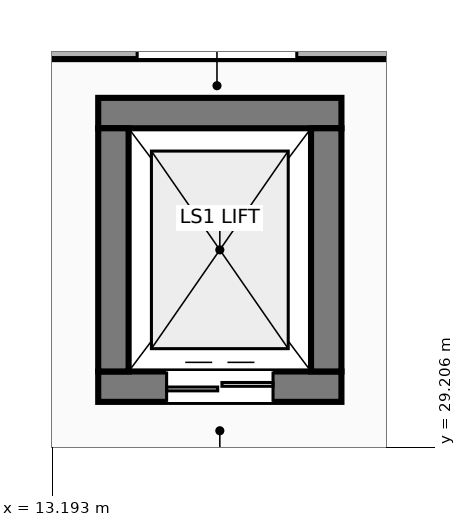
"""IFC4 building model, lengths in metres.
Left out: names, types, materials, properties, quantities, classifications, styles, units other than length and angle.
Written with IfcOpenShell. Run it as: python <this file> out.ifc"""

import sys

from ifc_helpers import new_model, si_unit, direction, frame, frame_2d, origin, place, context, subcontext, project, spatial, rectangle, extrude, element, fill, save


model = new_model("IFC4")
c1 = context("Model", 3, precision=1e-05, world=origin(), true_north=direction((0.0, 1.0)))
c2 = subcontext(c1, "Body", "Model", "MODEL_VIEW")
j1 = project(units=[si_unit("LENGTHUNIT", "METRE"), si_unit("PLANEANGLEUNIT", "RADIAN")], contexts=[c1])
p1 = place(None, origin())
s1 = spatial("IfcSite", under=j1, at=p1, CompositionType="ELEMENT")
p2 = place(p1, origin())
s2 = spatial("IfcBuilding", under=s1, at=p2, CompositionType="ELEMENT")
p3 = place(p2, frame((0.0, 0.0, 18.0)))
s3 = spatial("IfcBuildingStorey", under=s2, at=p3, CompositionType="ELEMENT", Elevation=18.0)
p4 = place(p3, frame((19.355, 34.445, 0.0), z_axis=(0.0, 0.0, 1.0), x_axis=(-1.0, 0.0, 0.0)))
e1 = element("IfcWall", 1, at=p4, inside=s3, PredefinedType="STANDARD", context=c2, shape_type="SweptSolid", body=[
    extrude(rectangle(XDim=7.985, YDim=0.27, at=frame_2d((3.992, 0.0))), origin(), (0.0, 0.0, 1.0), 3.275),
])
p5 = place(p4, frame((2.942, 0.0, 0.95)))
e2 = element("IfcOpeningElement", 2, at=p5, cuts=e1, PredefinedType="OPENING", context=c2, shape_type="SweptSolid", body=[
    extrude(rectangle(XDim=2.1, YDim=1.8, at=frame_2d((1.05, 0.9))), frame((0.0, 0.145, 0.0), z_axis=(0.0, -1.0, 0.0), x_axis=(1.0, 0.0, 0.0)), (0.0, 0.0, 1.0), 0.29),
])
p6 = place(p3, frame((13.8, 30.0, 0.0), z_axis=(0.0, 0.0, 1.0), x_axis=(1.0, 0.0, 0.0)))
e3 = element("IfcWall", 3, at=p6, inside=s3, PredefinedType="SHEAR", context=c2, shape_type="SweptSolid", body=[
    extrude(rectangle(XDim=3.2, YDim=0.4, at=frame_2d((1.6, 0.0))), origin(), (0.0, 0.0, 1.0), 4.2),
])
p7 = place(p6, frame((0.9, 0.0, 0.0)))
e4 = element("IfcOpeningElement", 4, at=p7, cuts=e3, PredefinedType="OPENING", context=c2, shape_type="SweptSolid", body=[
    extrude(rectangle(XDim=1.4, YDim=2.3, at=frame_2d((0.7, 1.15))), frame((0.0, 0.21, 0.0), z_axis=(0.0, -1.0, 0.0), x_axis=(1.0, 0.0, 0.0)), (0.0, 0.0, 1.0), 0.42),
])
for number, where, z_axis, x_axis in (
    (5, (17.0, 33.6, 0.0), (0.0, 0.0, 1.0), (-1.0, 0.0, 0.0)),
    (6, (14.0, 30.2, 0.0), (0.0, 0.0, 1.0), (0.0, 1.0, 0.0)),
    (7, (16.8, 33.4, 0.0), (0.0, 0.0, 1.0), (0.0, -1.0, 0.0)),
):
    element("IfcWall", number, at=place(p3, frame(where, z_axis=z_axis, x_axis=x_axis)), inside=s3, PredefinedType="SHEAR", context=c2, shape_type="SweptSolid", body=[
        extrude(rectangle(XDim=3.2, YDim=0.4, at=frame_2d((1.6, 0.0))), origin(), (0.0, 0.0, 1.0), 4.2),
    ])
p8 = place(p7, origin())
e8 = element("IfcDoor", 8, at=p8, inside=s3, OperationType="DOUBLE_DOOR_SLIDING", PredefinedType="DOOR", context=c2, shape_type="SweptSolid", body=[
    extrude(rectangle(XDim=1.4, YDim=2.3, at=frame_2d((0.7, 1.15))), frame((0.0, 0.025, 0.0), z_axis=(0.0, -1.0, 0.0), x_axis=(1.0, 0.0, 0.0)), (0.0, 0.0, 1.0), 0.05),
])
fill(e4, e8)
save(model, sys.argv[1])
